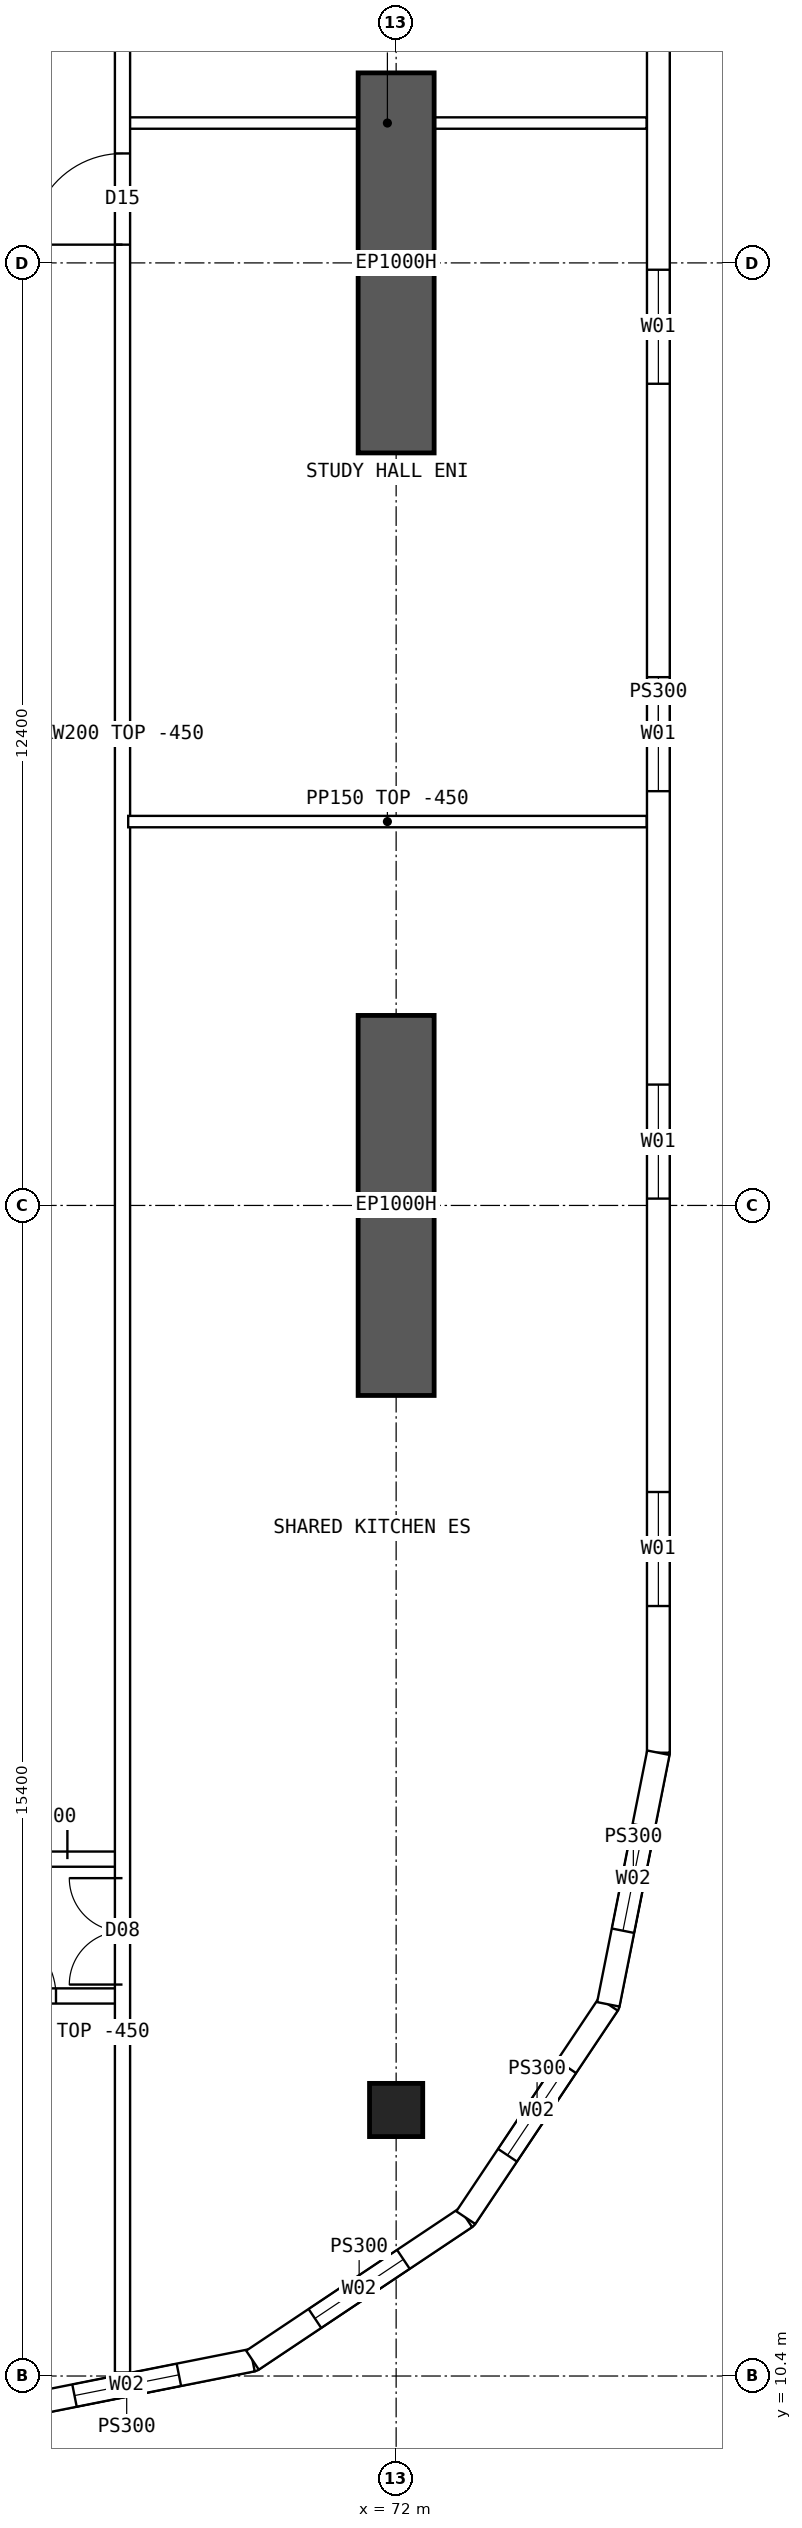
"""IFC4 building model, lengths in metres.
Left out: names, types, materials, properties, quantities, classifications, styles, units other than length and angle.
Written with IfcOpenShell. Run it as: python <this file> out.ifc"""

import sys

from ifc_helpers import new_model, si_unit, direction, frame, frame_2d, origin, origin_2d, place, context, subcontext, project, spatial, polyline, rectangle, hollow_rectangle, outline, extrude, element, fill, save


model = new_model("IFC4")
c1 = context("Model", 3, precision=1e-05, world=origin(), true_north=direction((0.0, 1.0)))
c2 = subcontext(c1, "Body", "Model", "MODEL_VIEW")
j1 = project(units=[si_unit("LENGTHUNIT", "METRE"), si_unit("PLANEANGLEUNIT", "RADIAN")], contexts=[c1])
p1 = place(None, origin())
s1 = spatial("IfcSite", under=j1, at=p1, CompositionType="ELEMENT")
p2 = place(p1, origin())
s2 = spatial("IfcBuilding", under=s1, at=p2, CompositionType="ELEMENT")
p3 = place(p2, frame((0.0, 0.0, 189.85)))
s3 = spatial("IfcBuildingStorey", under=s2, at=p3, CompositionType="ELEMENT", Elevation=189.85)
p4 = place(p3, frame((72.0, 13.9, 0.0), z_axis=(0.0, 0.0, 1.0), x_axis=(1.0, 0.0, 0.0)))
e1 = element("IfcColumn", 1, at=p4, inside=s3, PredefinedType="COLUMN", context=c2, shape_type="SweptSolid", body=[
    extrude(hollow_rectangle(XDim=0.7, YDim=0.7, WallThickness=0.07, at=origin_2d()), origin(), (0.0, 0.0, 1.0), 3.75),
])
for number, where, z_axis, x_axis in (
    (2, (72.0, 23.3, 0.0), (0.0, 0.0, 1.0), (0.0, 1.0, 0.0)),
    (3, (72.0, 35.7, 0.0), (0.0, 0.0, 1.0), (0.0, 1.0, 0.0)),
):
    element("IfcWall", number, at=place(p3, frame(where, z_axis=z_axis, x_axis=x_axis)), inside=s3, PredefinedType="SHEAR", context=c2, shape_type="SweptSolid", body=[
        extrude(rectangle(XDim=5.0, YDim=1.0, at=frame_2d((2.5, 0.0))), origin(), (0.0, 0.0, 1.0), 3.75),
    ])
p5 = place(p3, frame((75.45, 18.6, 0.0), z_axis=(0.0, 0.0, 1.0), x_axis=(0.0, 1.0, 0.0)))
e4 = element("IfcWall", 4, at=p5, inside=s3, PredefinedType="SOLIDWALL", context=c2, shape_type="SweptSolid", body=[
    extrude(outline(polyline([(-0.015, -0.15), (26.815, -0.15), (26.785, 0.15), (0.015, 0.15), (-0.015, -0.15)])), origin(), (0.0, 0.0, 1.0), 3.3),
])
p6 = place(p5, frame((1.93, 0.0, 0.9)))
e5 = element("IfcOpeningElement", 5, at=p6, cuts=e4, PredefinedType="OPENING", context=c2, shape_type="SweptSolid", body=[
    extrude(rectangle(XDim=1.5, YDim=2.0, at=frame_2d((0.75, 1.0))), frame((0.0, 0.16, 0.0), z_axis=(0.0, -1.0, 0.0), x_axis=(1.0, 0.0, 0.0)), (0.0, 0.0, 1.0), 0.32),
])
p7 = place(p5, frame((7.29, 0.0, 0.9)))
e6 = element("IfcOpeningElement", 6, at=p7, cuts=e4, PredefinedType="OPENING", context=c2, shape_type="SweptSolid", body=[
    extrude(rectangle(XDim=1.5, YDim=2.0, at=frame_2d((0.75, 1.0))), frame((0.0, 0.16, 0.0), z_axis=(0.0, -1.0, 0.0), x_axis=(1.0, 0.0, 0.0)), (0.0, 0.0, 1.0), 0.32),
])
p8 = place(p5, frame((12.65, 0.0, 0.9)))
e7 = element("IfcOpeningElement", 7, at=p8, cuts=e4, PredefinedType="OPENING", context=c2, shape_type="SweptSolid", body=[
    extrude(rectangle(XDim=1.5, YDim=2.0, at=frame_2d((0.75, 1.0))), frame((0.0, 0.16, 0.0), z_axis=(0.0, -1.0, 0.0), x_axis=(1.0, 0.0, 0.0)), (0.0, 0.0, 1.0), 0.32),
])
p9 = place(p5, frame((18.01, 0.0, 0.9)))
e8 = element("IfcOpeningElement", 8, at=p9, cuts=e4, PredefinedType="OPENING", context=c2, shape_type="SweptSolid", body=[
    extrude(rectangle(XDim=1.5, YDim=2.0, at=frame_2d((0.75, 1.0))), frame((0.0, 0.16, 0.0), z_axis=(0.0, -1.0, 0.0), x_axis=(1.0, 0.0, 0.0)), (0.0, 0.0, 1.0), 0.32),
])
p10 = place(p5, frame((23.37, 0.0, 0.9)))
e9 = element("IfcOpeningElement", 9, at=p10, cuts=e4, PredefinedType="OPENING", context=c2, shape_type="SweptSolid", body=[
    extrude(rectangle(XDim=1.5, YDim=2.0, at=frame_2d((0.75, 1.0))), frame((0.0, 0.16, 0.0), z_axis=(0.0, -1.0, 0.0), x_axis=(1.0, 0.0, 0.0)), (0.0, 0.0, 1.0), 0.32),
])
p11 = place(p3, frame((66.8, 9.95, 0.0), z_axis=(0.0, 0.0, 1.0), x_axis=(0.98078325777, 0.195100490205, 0.0)))
e10 = element("IfcWall", 10, at=p11, inside=s3, PredefinedType="SOLIDWALL", context=c2, shape_type="SweptSolid", body=[
    extrude(outline(polyline([(-0.03, -0.15), (3.405, -0.15), (3.345, 0.15), (0.03, 0.15), (-0.03, -0.15)])), origin(), (0.0, 0.0, 1.0), 3.3),
])
p12 = place(p11, frame((0.988, 0.0, 0.9)))
e11 = element("IfcOpeningElement", 11, at=p12, cuts=e10, PredefinedType="OPENING", context=c2, shape_type="SweptSolid", body=[
    extrude(rectangle(XDim=1.4, YDim=1.8, at=frame_2d((0.7, 0.9))), frame((0.0, 0.16, 0.0), z_axis=(0.0, -1.0, 0.0), x_axis=(1.0, 0.0, 0.0)), (0.0, 0.0, 1.0), 0.32),
])
p13 = place(p3, frame((70.11, 10.608, 0.0), z_axis=(0.0, 0.0, 1.0), x_axis=(0.831493450887, 0.555534554399, 0.0)))
e12 = element("IfcWall", 12, at=p13, inside=s3, PredefinedType="SOLIDWALL", context=c2, shape_type="SweptSolid", body=[
    extrude(outline(polyline([(-0.03, -0.15), (3.405, -0.15), (3.345, 0.15), (0.03, 0.15), (-0.03, -0.15)])), origin(), (0.0, 0.0, 1.0), 3.3),
])
p14 = place(p13, frame((0.988, 0.0, 0.9)))
e13 = element("IfcOpeningElement", 13, at=p14, cuts=e12, PredefinedType="OPENING", context=c2, shape_type="SweptSolid", body=[
    extrude(rectangle(XDim=1.4, YDim=1.8, at=frame_2d((0.7, 0.9))), frame((0.0, 0.16, 0.0), z_axis=(0.0, -1.0, 0.0), x_axis=(1.0, 0.0, 0.0)), (0.0, 0.0, 1.0), 0.32),
])
p15 = place(p3, frame((72.917, 12.483, 0.0), z_axis=(0.0, 0.0, 1.0), x_axis=(0.555534554399, 0.831493450887, 0.0)))
e14 = element("IfcWall", 14, at=p15, inside=s3, PredefinedType="SOLIDWALL", context=c2, shape_type="SweptSolid", body=[
    extrude(outline(polyline([(-0.03, -0.15), (3.405, -0.15), (3.345, 0.15), (0.03, 0.15), (-0.03, -0.15)])), origin(), (0.0, 0.0, 1.0), 3.3),
])
p16 = place(p15, frame((0.988, 0.0, 0.9)))
e15 = element("IfcOpeningElement", 15, at=p16, cuts=e14, PredefinedType="OPENING", context=c2, shape_type="SweptSolid", body=[
    extrude(rectangle(XDim=1.4, YDim=1.8, at=frame_2d((0.7, 0.9))), frame((0.0, 0.16, 0.0), z_axis=(0.0, -1.0, 0.0), x_axis=(1.0, 0.0, 0.0)), (0.0, 0.0, 1.0), 0.32),
])
p17 = place(p3, frame((74.792, 15.29, 0.0), z_axis=(0.0, 0.0, 1.0), x_axis=(0.19508664885, 0.980786011034, 0.0)))
e16 = element("IfcWall", 16, at=p17, inside=s3, PredefinedType="SOLIDWALL", context=c2, shape_type="SweptSolid", body=[
    extrude(outline(polyline([(-0.03, -0.15), (3.39, -0.15), (3.36, 0.15), (0.03, 0.15), (-0.03, -0.15)])), origin(), (0.0, 0.0, 1.0), 3.3),
])
p18 = place(p17, frame((0.988, 0.0, 0.9)))
e17 = element("IfcOpeningElement", 17, at=p18, cuts=e16, PredefinedType="OPENING", context=c2, shape_type="SweptSolid", body=[
    extrude(rectangle(XDim=1.4, YDim=1.8, at=frame_2d((0.7, 0.9))), frame((0.0, 0.16, 0.0), z_axis=(0.0, -1.0, 0.0), x_axis=(1.0, 0.0, 0.0)), (0.0, 0.0, 1.0), 0.32),
])
p19 = place(p3, frame((66.425, 15.4, 0.0), z_axis=(0.0, 0.0, 1.0), x_axis=(1.0, 0.0, 0.0)))
e18 = element("IfcWall", 18, at=p19, inside=s3, PredefinedType="SOLIDWALL", context=c2, shape_type="SweptSolid", body=[
    extrude(rectangle(XDim=1.975, YDim=0.2, at=frame_2d((0.987, 0.0))), origin(), (0.0, 0.0, 1.0), 3.3),
])
p20 = place(p19, frame((0.2, 0.0, 0.0)))
e19 = element("IfcOpeningElement", 19, at=p20, cuts=e18, PredefinedType="OPENING", context=c2, shape_type="SweptSolid", body=[
    extrude(rectangle(XDim=0.9, YDim=2.1, at=frame_2d((0.45, 1.05))), frame((0.0, 0.11, 0.0), z_axis=(0.0, -1.0, 0.0), x_axis=(1.0, 0.0, 0.0)), (0.0, 0.0, 1.0), 0.22),
])
p21 = place(p3, frame((66.425, 17.2, 0.0), z_axis=(0.0, 0.0, 1.0), x_axis=(1.0, 0.0, 0.0)))
e20 = element("IfcWall", 20, at=p21, inside=s3, PredefinedType="SOLIDWALL", context=c2, shape_type="SweptSolid", body=[
    extrude(rectangle(XDim=1.975, YDim=0.2, at=frame_2d((0.987, 0.0))), origin(), (0.0, 0.0, 1.0), 3.3),
])
p22 = place(p21, frame((0.05, 0.0, 0.0)))
e21 = element("IfcOpeningElement", 21, at=p22, cuts=e20, PredefinedType="OPENING", context=c2, shape_type="SweptSolid", body=[
    extrude(rectangle(XDim=1.2, YDim=2.1, at=frame_2d((0.6, 1.05))), frame((0.0, 0.11, 0.0), z_axis=(0.0, -1.0, 0.0), x_axis=(1.0, 0.0, 0.0)), (0.0, 0.0, 1.0), 0.22),
])
p23 = place(p3, frame((68.475, 30.85, 0.0), z_axis=(0.0, 0.0, 1.0), x_axis=(1.0, 0.0, 0.0)))
e22 = element("IfcWall", 22, at=p23, inside=s3, PredefinedType="PARTITIONING", context=c2, shape_type="SweptSolid", body=[
    extrude(outline(polyline([(0.0, 0.0), (6.82, 0.0), (6.82, 3.3), (3.827, 3.3), (3.825, 2.85), (3.227, 2.85), (3.225, 3.3), (0.0, 3.3), (0.0, 0.0)])), frame((0.0, 0.075, 0.0), z_axis=(0.0, -1.0, 0.0), x_axis=(1.0, 0.0, 0.0)), (0.0, 0.0, 1.0), 0.15),
])
p24 = place(p3, frame((68.4, 10.446, 0.0), z_axis=(0.0, 0.0, 1.0), x_axis=(0.0, 1.0, 0.0)))
e23 = element("IfcWall", 23, at=p24, inside=s3, PredefinedType="SOLIDWALL", context=c2, shape_type="SweptSolid", body=[
    extrude(rectangle(XDim=43.107, YDim=0.2, at=frame_2d((21.554, 0.0))), origin(), (0.0, 0.0, 1.0), 3.3),
])
p25 = place(p24, frame((27.994, 0.0, 0.0)))
e24 = element("IfcOpeningElement", 24, at=p25, cuts=e23, PredefinedType="OPENING", context=c2, shape_type="SweptSolid", body=[
    extrude(rectangle(XDim=1.2, YDim=2.1, at=frame_2d((0.6, 1.05))), frame((0.0, 0.11, 0.0), z_axis=(0.0, -1.0, 0.0), x_axis=(1.0, 0.0, 0.0)), (0.0, 0.0, 1.0), 0.22),
])
p26 = place(p24, frame((5.104, 0.0, 0.0)))
e25 = element("IfcOpeningElement", 25, at=p26, cuts=e23, PredefinedType="OPENING", context=c2, shape_type="SweptSolid", body=[
    extrude(rectangle(XDim=1.4, YDim=2.1, at=frame_2d((0.7, 1.05))), frame((0.0, 0.11, 0.0), z_axis=(0.0, -1.0, 0.0), x_axis=(1.0, 0.0, 0.0)), (0.0, 0.0, 1.0), 0.22),
])
p27 = place(p24, frame((36.504, 0.0, 0.0)))
e26 = element("IfcOpeningElement", 26, at=p27, cuts=e23, PredefinedType="OPENING", context=c2, shape_type="SweptSolid", body=[
    extrude(rectangle(XDim=1.4, YDim=2.1, at=frame_2d((0.7, 1.05))), frame((0.0, 0.11, 0.0), z_axis=(0.0, -1.0, 0.0), x_axis=(1.0, 0.0, 0.0)), (0.0, 0.0, 1.0), 0.22),
])
p28 = place(p3, frame((68.475, 40.04, 0.0), z_axis=(0.0, 0.0, 1.0), x_axis=(1.0, 0.0, 0.0)))
e27 = element("IfcWall", 27, at=p28, inside=s3, PredefinedType="PARTITIONING", context=c2, shape_type="SweptSolid", body=[
    extrude(rectangle(XDim=6.82, YDim=0.15, at=frame_2d((3.41, 0.0))), origin(), (0.0, 0.0, 1.0), 3.3),
])
p29 = place(p6, origin())
e28 = element("IfcWindow", 28, at=p29, inside=s3, PartitioningType="SINGLE_PANEL", PredefinedType="WINDOW", context=c2, shape_type="SweptSolid", body=[
    extrude(rectangle(XDim=1.5, YDim=2.0, at=frame_2d((0.75, 1.0))), frame((0.0, 0.03, 0.0), z_axis=(0.0, -1.0, 0.0), x_axis=(1.0, 0.0, 0.0)), (0.0, 0.0, 1.0), 0.06),
])
fill(e5, e28)
p30 = place(p7, origin())
e29 = element("IfcWindow", 29, at=p30, inside=s3, PartitioningType="SINGLE_PANEL", PredefinedType="WINDOW", context=c2, shape_type="SweptSolid", body=[
    extrude(rectangle(XDim=1.5, YDim=2.0, at=frame_2d((0.75, 1.0))), frame((0.0, 0.03, 0.0), z_axis=(0.0, -1.0, 0.0), x_axis=(1.0, 0.0, 0.0)), (0.0, 0.0, 1.0), 0.06),
])
fill(e6, e29)
p31 = place(p8, origin())
e30 = element("IfcWindow", 30, at=p31, inside=s3, PartitioningType="SINGLE_PANEL", PredefinedType="WINDOW", context=c2, shape_type="SweptSolid", body=[
    extrude(rectangle(XDim=1.5, YDim=2.0, at=frame_2d((0.75, 1.0))), frame((0.0, 0.03, 0.0), z_axis=(0.0, -1.0, 0.0), x_axis=(1.0, 0.0, 0.0)), (0.0, 0.0, 1.0), 0.06),
])
fill(e7, e30)
p32 = place(p9, origin())
e31 = element("IfcWindow", 31, at=p32, inside=s3, PartitioningType="SINGLE_PANEL", PredefinedType="WINDOW", context=c2, shape_type="SweptSolid", body=[
    extrude(rectangle(XDim=1.5, YDim=2.0, at=frame_2d((0.75, 1.0))), frame((0.0, 0.03, 0.0), z_axis=(0.0, -1.0, 0.0), x_axis=(1.0, 0.0, 0.0)), (0.0, 0.0, 1.0), 0.06),
])
fill(e8, e31)
p33 = place(p12, origin())
e32 = element("IfcWindow", 32, at=p33, inside=s3, PartitioningType="SINGLE_PANEL", PredefinedType="WINDOW", context=c2, shape_type="SweptSolid", body=[
    extrude(rectangle(XDim=1.4, YDim=1.8, at=frame_2d((0.7, 0.9))), frame((0.0, 0.03, 0.0), z_axis=(0.0, -1.0, 0.0), x_axis=(1.0, 0.0, 0.0)), (0.0, 0.0, 1.0), 0.06),
])
fill(e11, e32)
p34 = place(p14, origin())
e33 = element("IfcWindow", 33, at=p34, inside=s3, PartitioningType="SINGLE_PANEL", PredefinedType="WINDOW", context=c2, shape_type="SweptSolid", body=[
    extrude(rectangle(XDim=1.4, YDim=1.8, at=frame_2d((0.7, 0.9))), frame((0.0, 0.03, 0.0), z_axis=(0.0, -1.0, 0.0), x_axis=(1.0, 0.0, 0.0)), (0.0, 0.0, 1.0), 0.06),
])
fill(e13, e33)
p35 = place(p16, origin())
e34 = element("IfcWindow", 34, at=p35, inside=s3, PartitioningType="SINGLE_PANEL", PredefinedType="WINDOW", context=c2, shape_type="SweptSolid", body=[
    extrude(rectangle(XDim=1.4, YDim=1.8, at=frame_2d((0.7, 0.9))), frame((0.0, 0.03, 0.0), z_axis=(0.0, -1.0, 0.0), x_axis=(1.0, 0.0, 0.0)), (0.0, 0.0, 1.0), 0.06),
])
fill(e15, e34)
p36 = place(p18, origin())
e35 = element("IfcWindow", 35, at=p36, inside=s3, PartitioningType="SINGLE_PANEL", PredefinedType="WINDOW", context=c2, shape_type="SweptSolid", body=[
    extrude(rectangle(XDim=1.4, YDim=1.8, at=frame_2d((0.7, 0.9))), frame((0.0, 0.03, 0.0), z_axis=(0.0, -1.0, 0.0), x_axis=(1.0, 0.0, 0.0)), (0.0, 0.0, 1.0), 0.06),
])
fill(e17, e35)
p37 = place(p22, origin())
e36 = element("IfcDoor", 36, at=p37, inside=s3, OperationType="DOUBLE_DOOR_SINGLE_SWING", PredefinedType="DOOR", context=c2, shape_type="SweptSolid", body=[
    extrude(rectangle(XDim=1.2, YDim=2.1, at=frame_2d((0.6, 1.05))), frame((0.0, 0.025, 0.0), z_axis=(0.0, -1.0, 0.0), x_axis=(1.0, 0.0, 0.0)), (0.0, 0.0, 1.0), 0.05),
])
fill(e21, e36)
p38 = place(p25, origin())
e37 = element("IfcDoor", 37, at=p38, inside=s3, OperationType="SINGLE_SWING_LEFT", PredefinedType="DOOR", context=c2, shape_type="SweptSolid", body=[
    extrude(rectangle(XDim=1.2, YDim=2.1, at=frame_2d((0.6, 1.05))), frame((0.0, 0.025, 0.0), z_axis=(0.0, -1.0, 0.0), x_axis=(1.0, 0.0, 0.0)), (0.0, 0.0, 1.0), 0.05),
])
fill(e24, e37)
p39 = place(p26, origin())
e38 = element("IfcDoor", 38, at=p39, inside=s3, OperationType="DOUBLE_DOOR_SINGLE_SWING", PredefinedType="DOOR", context=c2, shape_type="SweptSolid", body=[
    extrude(rectangle(XDim=1.4, YDim=2.1, at=frame_2d((0.7, 1.05))), frame((0.0, 0.025, 0.0), z_axis=(0.0, -1.0, 0.0), x_axis=(1.0, 0.0, 0.0)), (0.0, 0.0, 1.0), 0.05),
])
fill(e25, e38)
p40 = place(p20, origin())
e39 = element("IfcDoor", 39, at=p40, inside=s3, OperationType="SINGLE_SWING_LEFT", PredefinedType="DOOR", context=c2, shape_type="SweptSolid", body=[
    extrude(rectangle(XDim=0.9, YDim=2.1, at=frame_2d((0.45, 1.05))), frame((0.0, 0.025, 0.0), z_axis=(0.0, -1.0, 0.0), x_axis=(1.0, 0.0, 0.0)), (0.0, 0.0, 1.0), 0.05),
])
fill(e19, e39)
save(model, sys.argv[1])
